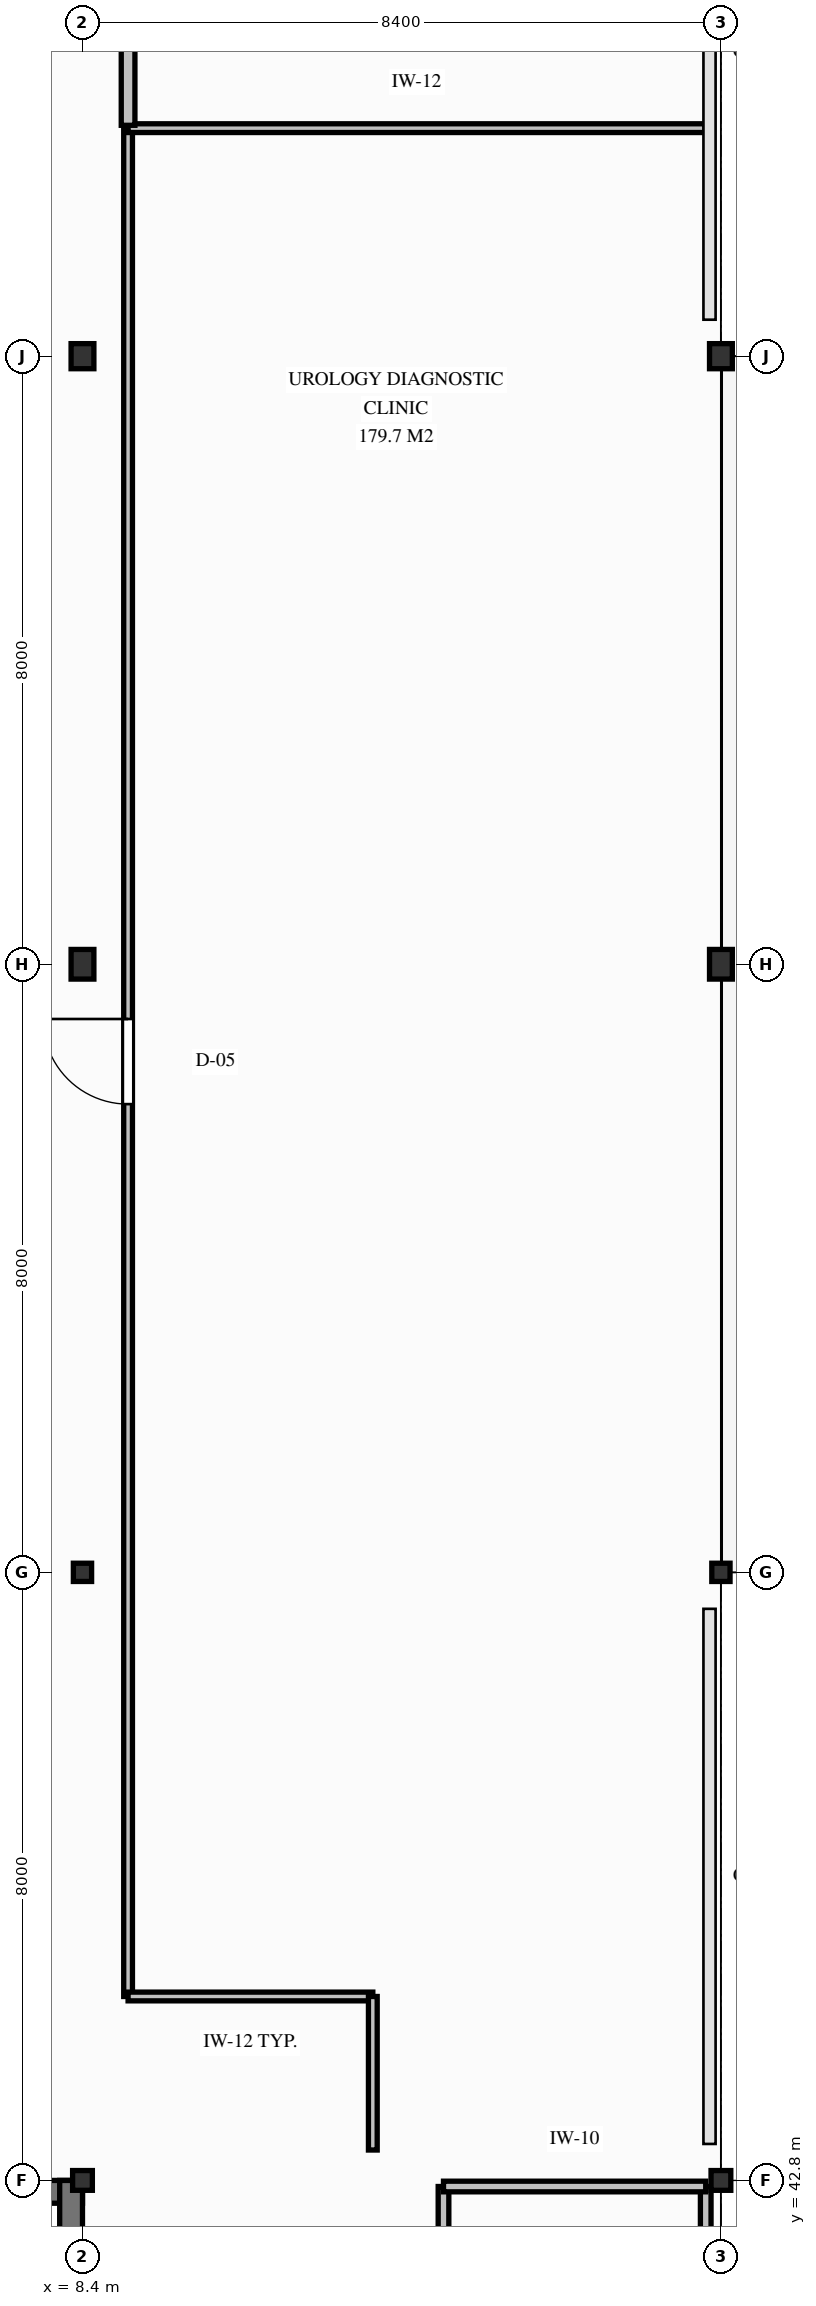
"""IFC4 building model, lengths in metres.
Left out: names, types, materials, properties, quantities, classifications, styles, units other than length and angle.
Written with IfcOpenShell. Run it as: python <this file> out.ifc"""

import sys

from ifc_helpers import new_model, si_unit, direction, frame, frame_2d, origin, origin_2d, place, context, subcontext, project, spatial, rectangle, i_section, extrude, element, fill, save


model = new_model("IFC4")
c1 = context("Model", 3, precision=1e-05, world=origin(), true_north=direction((0.0, 1.0)))
c2 = subcontext(c1, "Body", "Model", "MODEL_VIEW")
j1 = project(units=[si_unit("LENGTHUNIT", "METRE"), si_unit("PLANEANGLEUNIT", "RADIAN")], contexts=[c1])
p1 = place(None, origin())
s1 = spatial("IfcSite", under=j1, at=p1, CompositionType="ELEMENT")
p2 = place(p1, origin())
s2 = spatial("IfcBuilding", under=s1, at=p2, CompositionType="ELEMENT")
p3 = place(p2, frame((0.0, 0.0, 17.25)))
s3 = spatial("IfcBuildingStorey", under=s2, at=p3, CompositionType="ELEMENT", Elevation=17.25)
p4 = place(p3, frame((0.0, 42.65, 0.0), z_axis=(0.0, 0.0, 1.0), x_axis=(1.0, 0.0, 0.0)))
e1 = element("IfcWall", 1, at=p4, inside=s3, PredefinedType="SHEAR", context=c2, shape_type="SweptSolid", body=[
    extrude(rectangle(XDim=8.4, YDim=0.3, at=frame_2d((4.2, 0.0))), origin(), (0.0, 0.0, 1.0), 4.05),
])
p5 = place(p3, frame((8.25, 34.8, 0.0), z_axis=(0.0, 0.0, 1.0), x_axis=(0.0, 1.0, 0.0)))
e2 = element("IfcWall", 2, at=p5, inside=s3, PredefinedType="SHEAR", context=c2, shape_type="SweptSolid", body=[
    extrude(rectangle(XDim=8.0, YDim=0.3, at=frame_2d((4.0, 0.0))), origin(), (0.0, 0.0, 1.0), 4.05),
])
p6 = place(p5, frame((2.95, 0.0, 0.0)))
e3 = element("IfcOpeningElement", 3, at=p6, cuts=e2, PredefinedType="OPENING", context=c2, shape_type="SweptSolid", body=[
    extrude(rectangle(XDim=1.1, YDim=2.15, at=frame_2d((0.55, 1.075))), frame((0.0, 0.16, 0.0), z_axis=(0.0, -1.0, 0.0), x_axis=(1.0, 0.0, 0.0)), (0.0, 0.0, 1.0), 0.32),
])
p7 = place(p5, frame((1.0, 0.0, 0.0)))
e4 = element("IfcOpeningElement", 4, at=p7, cuts=e2, PredefinedType="OPENING", context=c2, shape_type="SweptSolid", body=[
    extrude(rectangle(XDim=1.1, YDim=2.1, at=frame_2d((0.55, 1.05))), frame((0.0, 0.16, 0.0), z_axis=(0.0, -1.0, 0.0), x_axis=(1.0, 0.0, 0.0)), (0.0, 0.0, 1.0), 0.32),
])
p8 = place(p3, frame((8.4, 42.8, 0.0), z_axis=(0.0, 0.0, 1.0), x_axis=(1.0, 0.0, 0.0)))
e5 = element("IfcColumn", 5, at=p8, inside=s3, PredefinedType="COLUMN", context=c2, shape_type="SweptSolid", body=[
    extrude(i_section(OverallWidth=0.26, OverallDepth=0.26, WebThickness=0.01, FlangeThickness=0.018, FilletRadius=0.024, at=origin_2d()), origin(), (0.0, 0.0, 1.0), 4.05),
])
p9 = place(p3, frame((8.4, 50.8, 0.0), z_axis=(0.0, 0.0, 1.0), x_axis=(1.0, 0.0, 0.0)))
e6 = element("IfcColumn", 6, at=p9, inside=s3, PredefinedType="COLUMN", context=c2, shape_type="SweptSolid", body=[
    extrude(i_section(OverallWidth=0.24, OverallDepth=0.24, WebThickness=0.01, FlangeThickness=0.017, FilletRadius=0.021, at=origin_2d()), origin(), (0.0, 0.0, 1.0), 4.05),
])
p10 = place(p3, frame((8.4, 58.8, 0.0), z_axis=(0.0, 0.0, 1.0), x_axis=(1.0, 0.0, 0.0)))
e7 = element("IfcColumn", 7, at=p10, inside=s3, PredefinedType="COLUMN", context=c2, shape_type="SweptSolid", body=[
    extrude(i_section(OverallWidth=0.3, OverallDepth=0.39, WebThickness=0.011, FlangeThickness=0.019, FilletRadius=0.027, at=origin_2d()), origin(), (0.0, 0.0, 1.0), 4.05),
])
p11 = place(p3, frame((8.4, 66.8, 0.0), z_axis=(0.0, 0.0, 1.0), x_axis=(1.0, 0.0, 0.0)))
e8 = element("IfcColumn", 8, at=p11, inside=s3, PredefinedType="COLUMN", context=c2, shape_type="SweptSolid", body=[
    extrude(i_section(OverallWidth=0.3, OverallDepth=0.33, WebThickness=0.01, FlangeThickness=0.017, FilletRadius=0.027, at=origin_2d()), origin(), (0.0, 0.0, 1.0), 4.05),
])
p12 = place(p3, frame((16.8, 42.8, 0.0), z_axis=(0.0, 0.0, 1.0), x_axis=(1.0, 0.0, 0.0)))
e9 = element("IfcColumn", 9, at=p12, inside=s3, PredefinedType="COLUMN", context=c2, shape_type="SweptSolid", body=[
    extrude(i_section(OverallWidth=0.26, OverallDepth=0.26, WebThickness=0.01, FlangeThickness=0.018, FilletRadius=0.024, at=origin_2d()), origin(), (0.0, 0.0, 1.0), 4.05),
])
p13 = place(p3, frame((16.8, 50.8, 0.0), z_axis=(0.0, 0.0, 1.0), x_axis=(1.0, 0.0, 0.0)))
e10 = element("IfcColumn", 10, at=p13, inside=s3, PredefinedType="COLUMN", context=c2, shape_type="SweptSolid", body=[
    extrude(i_section(OverallWidth=0.24, OverallDepth=0.24, WebThickness=0.01, FlangeThickness=0.017, FilletRadius=0.021, at=origin_2d()), origin(), (0.0, 0.0, 1.0), 4.05),
])
p14 = place(p3, frame((16.8, 58.8, 0.0), z_axis=(0.0, 0.0, 1.0), x_axis=(1.0, 0.0, 0.0)))
e11 = element("IfcColumn", 11, at=p14, inside=s3, PredefinedType="COLUMN", context=c2, shape_type="SweptSolid", body=[
    extrude(i_section(OverallWidth=0.3, OverallDepth=0.39, WebThickness=0.011, FlangeThickness=0.019, FilletRadius=0.027, at=origin_2d()), origin(), (0.0, 0.0, 1.0), 4.05),
])
p15 = place(p3, frame((16.8, 66.8, 0.0), z_axis=(0.0, 0.0, 1.0), x_axis=(1.0, 0.0, 0.0)))
e12 = element("IfcColumn", 12, at=p15, inside=s3, PredefinedType="COLUMN", context=c2, shape_type="SweptSolid", body=[
    extrude(i_section(OverallWidth=0.3, OverallDepth=0.33, WebThickness=0.01, FlangeThickness=0.017, FilletRadius=0.027, at=origin_2d()), origin(), (0.0, 0.0, 1.0), 4.05),
])
p16 = place(p3, frame((13.15, 34.9, 0.0), z_axis=(0.0, 0.0, 1.0), x_axis=(0.0, 1.0, 0.0)))
e13 = element("IfcWall", 13, at=p16, inside=s3, PredefinedType="PARTITIONING", context=c2, shape_type="SweptSolid", body=[
    extrude(rectangle(XDim=7.82, YDim=0.14, at=frame_2d((3.91, 0.0))), origin(), (0.0, 0.0, 1.0), 3.508),
])
p17 = place(p16, frame((0.9, 0.0, 0.0)))
e14 = element("IfcOpeningElement", 14, at=p17, cuts=e13, PredefinedType="OPENING", context=c2, shape_type="SweptSolid", body=[
    extrude(rectangle(XDim=0.95, YDim=2.12, at=frame_2d((0.475, 1.06))), frame((0.0, 0.08, 0.0), z_axis=(0.0, -1.0, 0.0), x_axis=(1.0, 0.0, 0.0)), (0.0, 0.0, 1.0), 0.16),
])
p18 = place(p16, frame((3.55, 0.0, 0.0)))
e15 = element("IfcOpeningElement", 15, at=p18, cuts=e13, PredefinedType="OPENING", context=c2, shape_type="SweptSolid", body=[
    extrude(rectangle(XDim=0.98, YDim=2.14, at=frame_2d((0.49, 1.07))), frame((0.0, 0.08, 0.0), z_axis=(0.0, -1.0, 0.0), x_axis=(1.0, 0.0, 0.0)), (0.0, 0.0, 1.0), 0.16),
])
p19 = place(p16, frame((6.08, 0.0, 0.0)))
e16 = element("IfcOpeningElement", 16, at=p19, cuts=e13, PredefinedType="OPENING", context=c2, shape_type="SweptSolid", body=[
    extrude(rectangle(XDim=0.98, YDim=2.14, at=frame_2d((0.49, 1.07))), frame((0.0, 0.08, 0.0), z_axis=(0.0, -1.0, 0.0), x_axis=(1.0, 0.0, 0.0)), (0.0, 0.0, 1.0), 0.16),
])
p20 = place(p3, frame((16.6, 34.9, 0.0), z_axis=(0.0, 0.0, 1.0), x_axis=(0.0, 1.0, 0.0)))
e17 = element("IfcWall", 17, at=p20, inside=s3, PredefinedType="PARTITIONING", context=c2, shape_type="SweptSolid", body=[
    extrude(rectangle(XDim=7.82, YDim=0.14, at=frame_2d((3.91, 0.0))), origin(), (0.0, 0.0, 1.0), 3.178),
])
p21 = place(p3, frame((13.15, 42.72, 0.0), z_axis=(0.0, 0.0, 1.0), x_axis=(1.0, 0.0, 0.0)))
e18 = element("IfcWall", 18, at=p21, inside=s3, PredefinedType="PARTITIONING", context=c2, shape_type="SweptSolid", body=[
    extrude(rectangle(XDim=3.45, YDim=0.14, at=frame_2d((1.725, 0.0))), origin(), (0.0, 0.0, 1.0), 3.178),
])
p22 = place(p3, frame((9.0, 45.22, 0.0), z_axis=(0.0, 0.0, 1.0), x_axis=(0.0, 1.0, 0.0)))
e19 = element("IfcWall", 19, at=p22, inside=s3, PredefinedType="PARTITIONING", context=c2, shape_type="SweptSolid", body=[
    extrude(rectangle(XDim=24.58, YDim=0.115, at=frame_2d((12.29, 0.0))), origin(), (0.0, 0.0, 1.0), 3.328),
])
p23 = place(p22, frame((11.74, 0.0, 0.0)))
e20 = element("IfcOpeningElement", 20, at=p23, cuts=e19, PredefinedType="OPENING", context=c2, shape_type="SweptSolid", body=[
    extrude(rectangle(XDim=1.12, YDim=2.18, at=frame_2d((0.56, 1.09))), frame((0.0, 0.067, 0.0), z_axis=(0.0, -1.0, 0.0), x_axis=(1.0, 0.0, 0.0)), (0.0, 0.0, 1.0), 0.135),
])
p24 = place(p3, frame((12.22, 45.22, 0.0), z_axis=(0.0, 0.0, 1.0), x_axis=(-1.0, 0.0, 0.0)))
e21 = element("IfcWall", 21, at=p24, inside=s3, PredefinedType="PARTITIONING", context=c2, shape_type="SweptSolid", body=[
    extrude(rectangle(XDim=3.22, YDim=0.115, at=frame_2d((1.61, 0.0))), origin(), (0.0, 0.0, 1.0), 3.78),
])
p25 = place(p3, frame((12.22, 43.2, 0.0), z_axis=(0.0, 0.0, 1.0), x_axis=(0.0, 1.0, 0.0)))
e22 = element("IfcWall", 22, at=p25, inside=s3, PredefinedType="PARTITIONING", context=c2, shape_type="SweptSolid", body=[
    extrude(rectangle(XDim=2.02, YDim=0.115, at=frame_2d((1.01, 0.0))), origin(), (0.0, 0.0, 1.0), 3.78),
])
p26 = place(p3, frame((9.0, 69.8, 0.0), z_axis=(0.0, 0.0, 1.0), x_axis=(1.0, 0.0, 0.0)))
e23 = element("IfcWall", 23, at=p26, inside=s3, PredefinedType="PARTITIONING", context=c2, shape_type="SweptSolid", body=[
    extrude(rectangle(XDim=7.59, YDim=0.115, at=frame_2d((3.795, 0.0))), origin(), (0.0, 0.0, 1.0), 3.438),
])
p27 = place(p3, frame((9.0, 94.6, 0.0), z_axis=(0.0, 0.0, 1.0), x_axis=(0.0, -1.0, 0.0)))
e24 = element("IfcWall", 24, at=p27, inside=s3, PredefinedType="PARTITIONING", context=c2, shape_type="SweptSolid", body=[
    extrude(rectangle(XDim=24.763, YDim=0.18, at=frame_2d((12.381, 0.0))), origin(), (0.0, 0.0, 1.0), 3.278),
])
p28 = place(p27, frame((12.3, 0.0, 0.0)))
e25 = element("IfcOpeningElement", 25, at=p28, cuts=e24, PredefinedType="OPENING", context=c2, shape_type="SweptSolid", body=[
    extrude(rectangle(XDim=1.18, YDim=2.2, at=frame_2d((0.59, 1.1))), frame((0.0, 0.1, 0.0), z_axis=(0.0, -1.0, 0.0), x_axis=(1.0, 0.0, 0.0)), (0.0, 0.0, 1.0), 0.2),
])
p29 = place(p23, origin())
e26 = element("IfcDoor", 26, at=p29, inside=s3, OperationType="SINGLE_SWING_RIGHT", PredefinedType="DOOR", context=c2, shape_type="SweptSolid", body=[
    extrude(rectangle(XDim=1.12, YDim=2.18, at=frame_2d((0.56, 1.09))), frame((0.0, 0.025, 0.0), z_axis=(0.0, -1.0, 0.0), x_axis=(1.0, 0.0, 0.0)), (0.0, 0.0, 1.0), 0.05),
])
fill(e20, e26)
save(model, sys.argv[1])
